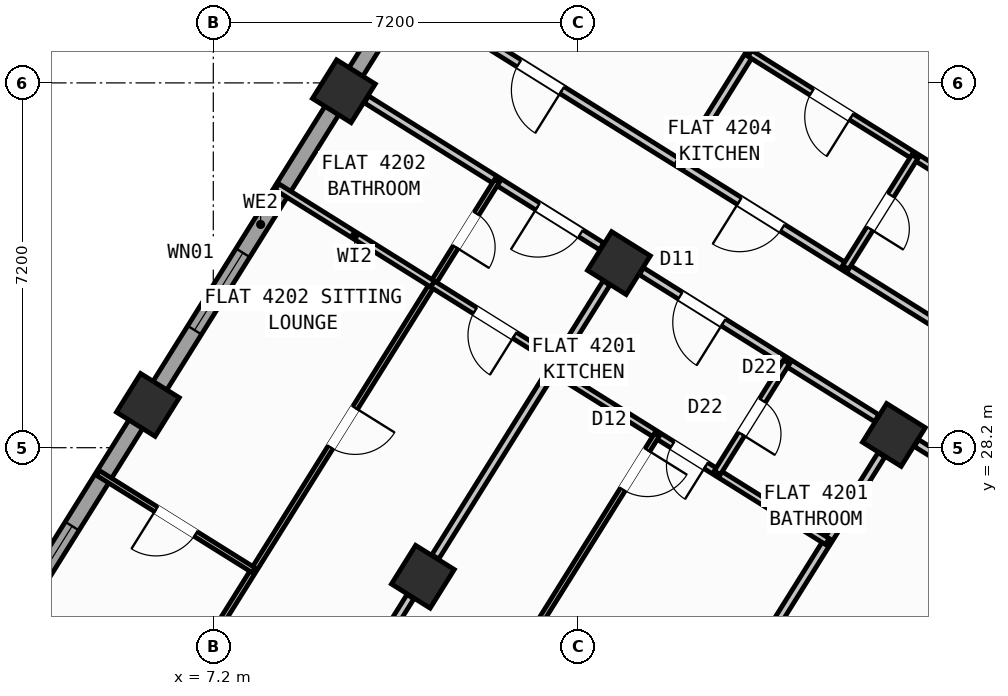
"""IFC4 building model, lengths in metres.
Left out: names, types, materials, properties, quantities, classifications, styles, units other than length and angle.
Written with IfcOpenShell. Run it as: python <this file> out.ifc"""

import sys

from ifc_helpers import new_model, si_unit, direction, frame, frame_2d, origin, origin_2d, place, context, subcontext, project, spatial, rectangle, hollow_rectangle, extrude, source, transform, mapped, element, fill, save


model = new_model("IFC4")
c1 = context("Model", 3, precision=1e-05, world=origin(), true_north=direction((0.0, 1.0)))
c2 = subcontext(c1, "Body", "Model", "MODEL_VIEW")
j1 = project(units=[si_unit("LENGTHUNIT", "METRE"), si_unit("PLANEANGLEUNIT", "RADIAN")], contexts=[c1])
p1 = place(None, origin())
s1 = spatial("IfcSite", under=j1, at=p1, CompositionType="ELEMENT")
p2 = place(p1, origin())
s2 = spatial("IfcBuilding", under=s1, at=p2, CompositionType="ELEMENT")
p3 = place(p2, frame((0.0, 0.0, 165.9)))
s3 = spatial("IfcBuildingStorey", under=s2, at=p3, CompositionType="ELEMENT", Elevation=165.9)
m1 = source(origin(), c2, "Body", "SweptSolid", [
    extrude(hollow_rectangle(XDim=0.9, YDim=0.9, WallThickness=0.036, at=origin_2d()), origin(), (0.0, 0.0, 1.0), 3.6),
])
for number, where, z_axis, x_axis in (
    (1, (20.632, 28.452, 0.0), (0.0, 0.0, 1.0), (-0.848, 0.53, 0.0)),
    (2, (15.205, 31.844, 0.0), (0.0, 0.0, 1.0), (-0.848, 0.53, 0.0)),
    (3, (11.336, 25.653, 0.0), (0.0, 0.0, 1.0), (-0.848, 0.53, 0.0)),
    (4, (9.777, 35.235, 0.0), (0.0, 0.0, 1.0), (-0.848, 0.53, 0.0)),
    (5, (5.909, 29.044, 0.0), (0.0, 0.0, 1.0), (-0.848, 0.53, 0.0)),
):
    element("IfcColumn", number, at=place(p3, frame(where, z_axis=z_axis, x_axis=x_axis)), inside=s3, PredefinedType="COLUMN", context=c2, shape_type="MappedRepresentation", body=[
        mapped(m1, transform((0.0, 0.0, 0.0), scale=1.0)),
    ])
p4 = place(p3, frame((2.415, 23.452, 0.0), z_axis=(0.0, 0.0, 1.0), x_axis=(0.52991049553, 0.848053575387, 0.0)))
e6 = element("IfcWall", 6, at=p4, inside=s3, PredefinedType="STANDARD", context=c2, shape_type="SweptSolid", body=[
    extrude(rectangle(XDim=21.587, YDim=0.32, at=frame_2d((10.794, 0.0))), origin(), (0.0, 0.0, 1.0), 2.795),
])
p5 = place(p4, frame((1.673, 0.0, 0.8)))
e7 = element("IfcOpeningElement", 7, at=p5, cuts=e6, PredefinedType="OPENING", context=c2, shape_type="SweptSolid", body=[
    extrude(rectangle(XDim=2.1, YDim=1.55, at=frame_2d((1.05, 0.775))), frame((0.0, 0.17, 0.0), z_axis=(0.0, -1.0, 0.0), x_axis=(1.0, 0.0, 0.0)), (0.0, 0.0, 1.0), 0.34),
])
p6 = place(p4, frame((8.334, 0.0, 0.85)))
e8 = element("IfcOpeningElement", 8, at=p6, cuts=e6, PredefinedType="OPENING", context=c2, shape_type="SweptSolid", body=[
    extrude(rectangle(XDim=1.8, YDim=1.5, at=frame_2d((0.9, 0.75))), frame((0.0, 0.17, 0.0), z_axis=(0.0, -1.0, 0.0), x_axis=(1.0, 0.0, 0.0)), (0.0, 0.0, 1.0), 0.34),
])
p7 = place(p4, frame((17.172, 0.0, 0.85)))
e9 = element("IfcOpeningElement", 9, at=p7, cuts=e6, PredefinedType="OPENING", context=c2, shape_type="SweptSolid", body=[
    extrude(rectangle(XDim=1.5, YDim=1.5, at=frame_2d((0.75, 0.75))), frame((0.0, 0.17, 0.0), z_axis=(0.0, -1.0, 0.0), x_axis=(1.0, 0.0, 0.0)), (0.0, 0.0, 1.0), 0.34),
])
p8 = place(p3, frame((14.138, 41.825, 0.0), z_axis=(0.0, 0.0, 1.0), x_axis=(0.848046498049, -0.529921821731, 0.0)))
e10 = element("IfcWall", 10, at=p8, inside=s3, PredefinedType="STANDARD", context=c2, shape_type="SweptSolid", body=[
    extrude(rectangle(XDim=31.588, YDim=0.32, at=frame_2d((15.794, 0.0))), origin(), (0.0, 0.0, 1.0), 3.32),
])
p9 = place(p8, frame((3.253, 0.0, 0.0)))
e11 = element("IfcOpeningElement", 11, at=p9, cuts=e10, PredefinedType="OPENING", context=c2, shape_type="SweptSolid", body=[
    extrude(rectangle(XDim=1.05, YDim=2.15, at=frame_2d((0.525, 1.075))), frame((0.0, 0.17, 0.0), z_axis=(0.0, -1.0, 0.0), x_axis=(1.0, 0.0, 0.0)), (0.0, 0.0, 1.0), 0.34),
])
p10 = place(p8, frame((0.863, 0.0, 0.85)))
e12 = element("IfcOpeningElement", 12, at=p10, cuts=e10, PredefinedType="OPENING", context=c2, shape_type="SweptSolid", body=[
    extrude(rectangle(XDim=1.8, YDim=1.5, at=frame_2d((0.9, 0.75))), frame((0.0, 0.17, 0.0), z_axis=(0.0, -1.0, 0.0), x_axis=(1.0, 0.0, 0.0)), (0.0, 0.0, 1.0), 0.34),
])
p11 = place(p8, frame((8.494, 0.0, 0.85)))
e13 = element("IfcOpeningElement", 13, at=p11, cuts=e10, PredefinedType="OPENING", context=c2, shape_type="SweptSolid", body=[
    extrude(rectangle(XDim=1.8, YDim=1.5, at=frame_2d((0.9, 0.75))), frame((0.0, 0.17, 0.0), z_axis=(0.0, -1.0, 0.0), x_axis=(1.0, 0.0, 0.0)), (0.0, 0.0, 1.0), 0.34),
])
p12 = place(p8, frame((13.874, 0.0, 0.85)))
e14 = element("IfcOpeningElement", 14, at=p12, cuts=e10, PredefinedType="OPENING", context=c2, shape_type="SweptSolid", body=[
    extrude(rectangle(XDim=1.5, YDim=1.5, at=frame_2d((0.75, 0.75))), frame((0.0, 0.17, 0.0), z_axis=(0.0, -1.0, 0.0), x_axis=(1.0, 0.0, 0.0)), (0.0, 0.0, 1.0), 0.34),
])
p13 = place(p8, frame((17.104, 0.0, 1.0)))
e15 = element("IfcOpeningElement", 15, at=p13, cuts=e10, PredefinedType="OPENING", context=c2, shape_type="SweptSolid", body=[
    extrude(rectangle(XDim=0.9, YDim=1.25, at=frame_2d((0.45, 0.625))), frame((0.0, 0.17, 0.0), z_axis=(0.0, -1.0, 0.0), x_axis=(1.0, 0.0, 0.0)), (0.0, 0.0, 1.0), 0.34),
])
p14 = place(p8, frame((22.144, 0.0, 1.0)))
e16 = element("IfcOpeningElement", 16, at=p14, cuts=e10, PredefinedType="OPENING", context=c2, shape_type="SweptSolid", body=[
    extrude(rectangle(XDim=0.9, YDim=1.25, at=frame_2d((0.45, 0.625))), frame((0.0, 0.17, 0.0), z_axis=(0.0, -1.0, 0.0), x_axis=(1.0, 0.0, 0.0)), (0.0, 0.0, 1.0), 0.34),
])
p15 = place(p8, frame((27.744, 0.0, 1.0)))
e17 = element("IfcOpeningElement", 17, at=p15, cuts=e10, PredefinedType="OPENING", context=c2, shape_type="SweptSolid", body=[
    extrude(rectangle(XDim=0.9, YDim=1.25, at=frame_2d((0.45, 0.625))), frame((0.0, 0.17, 0.0), z_axis=(0.0, -1.0, 0.0), x_axis=(1.0, 0.0, 0.0)), (0.0, 0.0, 1.0), 0.34),
])
p16 = place(p3, frame((23.899, 26.529, 0.0), z_axis=(0.0, 0.0, 1.0), x_axis=(-0.529917716469, -0.848049063305, 0.0)))
e18 = element("IfcWall", 18, at=p16, inside=s3, PredefinedType="PARTITIONING", context=c2, shape_type="SweptSolid", body=[
    extrude(rectangle(XDim=14.05, YDim=0.16, at=frame_2d((7.025, 0.0))), origin(), (0.0, 0.0, 1.0), 3.31),
])
p17 = place(p3, frame((25.065, 28.394, 0.0), z_axis=(0.0, 0.0, 1.0), x_axis=(-0.848048310262, 0.529918921593, 0.0)))
e19 = element("IfcWall", 19, at=p17, inside=s3, PredefinedType="PARTITIONING", context=c2, shape_type="SweptSolid", body=[
    extrude(rectangle(XDim=16.73, YDim=0.16, at=frame_2d((8.365, 0.0))), origin(), (0.0, 0.0, 1.0), 3.31),
])
p18 = place(p17, frame((2.22, 0.0, 0.0)))
e20 = element("IfcOpeningElement", 20, at=p18, cuts=e19, PredefinedType="OPENING", context=c2, shape_type="SweptSolid", body=[
    extrude(rectangle(XDim=0.86, YDim=2.05, at=frame_2d((0.43, 1.025))), frame((0.0, 0.09, 0.0), z_axis=(0.0, -1.0, 0.0), x_axis=(1.0, 0.0, 0.0)), (0.0, 0.0, 1.0), 0.18),
])
p19 = place(p17, frame((7.82, 0.0, 0.0)))
e21 = element("IfcOpeningElement", 21, at=p19, cuts=e19, PredefinedType="OPENING", context=c2, shape_type="SweptSolid", body=[
    extrude(rectangle(XDim=1.0, YDim=2.1, at=frame_2d((0.5, 1.05))), frame((0.0, 0.09, 0.0), z_axis=(0.0, -1.0, 0.0), x_axis=(1.0, 0.0, 0.0)), (0.0, 0.0, 1.0), 0.18),
])
p20 = place(p17, frame((12.95, 0.0, 0.0)))
e22 = element("IfcOpeningElement", 22, at=p20, cuts=e19, PredefinedType="OPENING", context=c2, shape_type="SweptSolid", body=[
    extrude(rectangle(XDim=1.0, YDim=2.1, at=frame_2d((0.5, 1.05))), frame((0.0, 0.09, 0.0), z_axis=(0.0, -1.0, 0.0), x_axis=(1.0, 0.0, 0.0)), (0.0, 0.0, 1.0), 0.18),
])
p21 = place(p3, frame((23.899, 26.529, 0.0), z_axis=(0.0, 0.0, 1.0), x_axis=(-0.848064240775, 0.529893426567, 0.0)))
e23 = element("IfcWall", 23, at=p21, inside=s3, PredefinedType="PARTITIONING", context=c2, shape_type="SweptSolid", body=[
    extrude(rectangle(XDim=3.328, YDim=0.16, at=frame_2d((1.664, 0.0))), origin(), (0.0, 0.0, 1.0), 2.795),
])
p22 = place(p21, frame((1.395, 0.0, 0.0)))
e24 = element("IfcOpeningElement", 24, at=p22, cuts=e23, PredefinedType="OPENING", context=c2, shape_type="SweptSolid", body=[
    extrude(rectangle(XDim=1.0, YDim=2.1, at=frame_2d((0.5, 1.05))), frame((0.0, 0.09, 0.0), z_axis=(0.0, -1.0, 0.0), x_axis=(1.0, 0.0, 0.0)), (0.0, 0.0, 1.0), 0.18),
])
p23 = place(p3, frame((20.293, 28.782, 0.0), z_axis=(0.0, 0.0, 1.0), x_axis=(-0.848040881926, 0.529930809241, 0.0)))
e25 = element("IfcWall", 25, at=p23, inside=s3, PredefinedType="PARTITIONING", context=c2, shape_type="SweptSolid", body=[
    extrude(rectangle(XDim=5.476, YDim=0.16, at=frame_2d((2.738, 0.0))), origin(), (0.0, 0.0, 1.0), 2.795),
])
p24 = place(p23, frame((3.568, 0.0, 0.0)))
e26 = element("IfcOpeningElement", 26, at=p24, cuts=e25, PredefinedType="OPENING", context=c2, shape_type="SweptSolid", body=[
    extrude(rectangle(XDim=1.0, YDim=2.1, at=frame_2d((0.5, 1.05))), frame((0.0, 0.09, 0.0), z_axis=(0.0, -1.0, 0.0), x_axis=(1.0, 0.0, 0.0)), (0.0, 0.0, 1.0), 0.18),
])
p25 = place(p3, frame((14.866, 32.173, 0.0), z_axis=(0.0, 0.0, 1.0), x_axis=(-0.848053401719, 0.529910773464, 0.0)))
e27 = element("IfcWall", 27, at=p25, inside=s3, PredefinedType="PARTITIONING", context=c2, shape_type="SweptSolid", body=[
    extrude(rectangle(XDim=5.476, YDim=0.16, at=frame_2d((2.738, 0.0))), origin(), (0.0, 0.0, 1.0), 2.795),
])
p26 = place(p25, frame((0.488, 0.0, 0.0)))
e28 = element("IfcOpeningElement", 28, at=p26, cuts=e27, PredefinedType="OPENING", context=c2, shape_type="SweptSolid", body=[
    extrude(rectangle(XDim=1.0, YDim=2.1, at=frame_2d((0.5, 1.05))), frame((0.0, 0.09, 0.0), z_axis=(0.0, -1.0, 0.0), x_axis=(1.0, 0.0, 0.0)), (0.0, 0.0, 1.0), 0.18),
])
for number, where, z_axis, x_axis in (
    (29, (20.387, 28.06, 0.0), (0.0, 0.0, 1.0), (-0.53, -0.848, 0.0)),
    (30, (14.96, 31.452, 0.0), (0.0, 0.0, 1.0), (-0.53, -0.848, 0.0)),
):
    element("IfcWall", number, at=place(p3, frame(where, z_axis=z_axis, x_axis=x_axis)), inside=s3, PredefinedType="PARTITIONING", context=c2, shape_type="SweptSolid", body=[
        extrude(rectangle(XDim=6.376, YDim=0.16, at=frame_2d((3.188, 0.0))), origin(), (0.0, 0.0, 1.0), 2.795),
    ])
p27 = place(p3, frame((11.091, 25.261, 0.0), z_axis=(0.0, 0.0, 1.0), x_axis=(-0.52994257524, -0.848033529377, 0.0)))
e31 = element("IfcWall", 31, at=p27, inside=s3, PredefinedType="PARTITIONING", context=c2, shape_type="SweptSolid", body=[
    extrude(rectangle(XDim=5.451, YDim=0.16, at=frame_2d((2.726, 0.0))), origin(), (0.0, 0.0, 1.0), 2.795),
])
p28 = place(p3, frame((19.318, 26.349, 0.0), z_axis=(0.0, 0.0, 1.0), x_axis=(-0.848039019877, 0.529933789039, 0.0)))
e32 = element("IfcWall", 32, at=p28, inside=s3, PredefinedType="PLUMBINGWALL", context=c2, shape_type="SweptSolid", body=[
    extrude(rectangle(XDim=6.4, YDim=0.14, at=frame_2d((3.2, 0.0))), origin(), (0.0, 0.0, 1.0), 3.31),
])
p29 = place(p28, frame((2.824, 0.0, 0.0)))
e33 = element("IfcOpeningElement", 33, at=p29, cuts=e32, PredefinedType="OPENING", context=c2, shape_type="SweptSolid", body=[
    extrude(rectangle(XDim=0.78, YDim=2.05, at=frame_2d((0.39, 1.025))), frame((0.0, 0.08, 0.0), z_axis=(0.0, -1.0, 0.0), x_axis=(1.0, 0.0, 0.0)), (0.0, 0.0, 1.0), 0.16),
])
p30 = place(p3, frame((18.514, 29.894, 0.0), z_axis=(0.0, 0.0, 1.0), x_axis=(-0.529913878929, -0.848051461244, 0.0)))
e34 = element("IfcWall", 34, at=p30, inside=s3, PredefinedType="PLUMBINGWALL", context=c2, shape_type="SweptSolid", body=[
    extrude(rectangle(XDim=2.58, YDim=0.14, at=frame_2d((1.29, 0.0))), origin(), (0.0, 0.0, 1.0), 3.31),
])
p31 = place(p30, frame((0.9, 0.0, 0.0)))
e35 = element("IfcOpeningElement", 35, at=p31, cuts=e34, PredefinedType="OPENING", context=c2, shape_type="SweptSolid", body=[
    extrude(rectangle(XDim=0.78, YDim=2.05, at=frame_2d((0.39, 1.025))), frame((0.0, 0.08, 0.0), z_axis=(0.0, -1.0, 0.0), x_axis=(1.0, 0.0, 0.0)), (0.0, 0.0, 1.0), 0.16),
])
p32 = place(p3, frame((15.953, 28.452, 0.0), z_axis=(0.0, 0.0, 1.0), x_axis=(-0.529931645041, -0.848040359643, 0.0)))
e36 = element("IfcWall", 36, at=p32, inside=s3, PredefinedType="PARTITIONING", context=c2, shape_type="SweptSolid", body=[
    extrude(rectangle(XDim=11.74, YDim=0.11, at=frame_2d((5.87, 0.0))), origin(), (0.0, 0.0, 1.0), 3.31),
])
p33 = place(p32, frame((0.35, 0.0, 0.0)))
e37 = element("IfcOpeningElement", 37, at=p33, cuts=e36, PredefinedType="OPENING", context=c2, shape_type="SweptSolid", body=[
    extrude(rectangle(XDim=0.92, YDim=2.08, at=frame_2d((0.46, 1.04))), frame((0.0, 0.065, 0.0), z_axis=(0.0, -1.0, 0.0), x_axis=(1.0, 0.0, 0.0)), (0.0, 0.0, 1.0), 0.13),
])
p34 = place(p3, frame((12.798, 33.465, 0.0), z_axis=(0.0, 0.0, 1.0), x_axis=(-0.529916182913, -0.848050021571, 0.0)))
e38 = element("IfcWall", 38, at=p34, inside=s3, PredefinedType="PARTITIONING", context=c2, shape_type="SweptSolid", body=[
    extrude(rectangle(XDim=14.32, YDim=0.11, at=frame_2d((7.16, 0.0))), origin(), (0.0, 0.0, 1.0), 3.31),
])
p35 = place(p34, frame((0.76, 0.0, 0.0)))
e39 = element("IfcOpeningElement", 39, at=p35, cuts=e38, PredefinedType="OPENING", context=c2, shape_type="SweptSolid", body=[
    extrude(rectangle(XDim=0.78, YDim=2.05, at=frame_2d((0.39, 1.025))), frame((0.0, 0.065, 0.0), z_axis=(0.0, -1.0, 0.0), x_axis=(1.0, 0.0, 0.0)), (0.0, 0.0, 1.0), 0.13),
])
p36 = place(p34, frame((5.281, 0.0, 0.0)))
e40 = element("IfcOpeningElement", 40, at=p36, cuts=e38, PredefinedType="OPENING", context=c2, shape_type="SweptSolid", body=[
    extrude(rectangle(XDim=0.92, YDim=2.08, at=frame_2d((0.46, 1.04))), frame((0.0, 0.065, 0.0), z_axis=(0.0, -1.0, 0.0), x_axis=(1.0, 0.0, 0.0)), (0.0, 0.0, 1.0), 0.13),
])
p37 = place(p3, frame((13.986, 29.893, 0.0), z_axis=(0.0, 0.0, 1.0), x_axis=(-0.84802195137, 0.529961102341, 0.0)))
e41 = element("IfcWall", 41, at=p37, inside=s3, PredefinedType="PLUMBINGWALL", context=c2, shape_type="SweptSolid", body=[
    extrude(rectangle(XDim=2.9, YDim=0.14, at=frame_2d((1.45, 0.0))), origin(), (0.0, 0.0, 1.0), 3.31),
])
p38 = place(p37, frame((0.99, 0.0, 0.0)))
e42 = element("IfcOpeningElement", 42, at=p38, cuts=e41, PredefinedType="OPENING", context=c2, shape_type="SweptSolid", body=[
    extrude(rectangle(XDim=0.92, YDim=2.08, at=frame_2d((0.46, 1.04))), frame((0.0, 0.08, 0.0), z_axis=(0.0, -1.0, 0.0), x_axis=(1.0, 0.0, 0.0)), (0.0, 0.0, 1.0), 0.16),
])
p39 = place(p3, frame((11.526, 31.43, 0.0), z_axis=(0.0, 0.0, 1.0), x_axis=(-0.848051346257, 0.52991406295, 0.0)))
e43 = element("IfcWall", 43, at=p39, inside=s3, PredefinedType="PLUMBINGWALL", context=c2, shape_type="SweptSolid", body=[
    extrude(rectangle(XDim=3.62, YDim=0.14, at=frame_2d((1.81, 0.0))), origin(), (0.0, 0.0, 1.0), 3.31),
])
p40 = place(p3, frame((7.997, 25.781, 0.0), z_axis=(0.0, 0.0, 1.0), x_axis=(-0.848051346257, 0.52991406295, 0.0)))
e44 = element("IfcWall", 44, at=p40, inside=s3, PredefinedType="PARTITIONING", context=c2, shape_type="SweptSolid", body=[
    extrude(rectangle(XDim=3.62, YDim=0.11, at=frame_2d((1.81, 0.0))), origin(), (0.0, 0.0, 1.0), 3.31),
])
p41 = place(p40, frame((1.35, 0.0, 0.0)))
e45 = element("IfcOpeningElement", 45, at=p41, cuts=e44, PredefinedType="OPENING", context=c2, shape_type="SweptSolid", body=[
    extrude(rectangle(XDim=0.92, YDim=2.08, at=frame_2d((0.46, 1.04))), frame((0.0, 0.065, 0.0), z_axis=(0.0, -1.0, 0.0), x_axis=(1.0, 0.0, 0.0)), (0.0, 0.0, 1.0), 0.13),
])
p42 = place(p3, frame((18.828, 37.643, 0.0), z_axis=(0.0, 0.0, 1.0), x_axis=(-0.529926399231, -0.848043637673, 0.0)))
e46 = element("IfcWall", 46, at=p42, inside=s3, PredefinedType="PARTITIONING", context=c2, shape_type="SweptSolid", body=[
    extrude(rectangle(XDim=4.538, YDim=0.16, at=frame_2d((2.269, 0.0))), origin(), (0.0, 0.0, 1.0), 2.795),
])
p43 = place(p3, frame((23.218, 32.591, 0.0), z_axis=(0.0, 0.0, 1.0), x_axis=(-0.848056163074, 0.529906354247, 0.0)))
e47 = element("IfcWall", 47, at=p43, inside=s3, PredefinedType="PLUMBINGWALL", context=c2, shape_type="SweptSolid", body=[
    extrude(rectangle(XDim=6.4, YDim=0.14, at=frame_2d((3.2, 0.0))), origin(), (0.0, 0.0, 1.0), 3.31),
])
p44 = place(p43, frame((4.04, 0.0, 0.0)))
e48 = element("IfcOpeningElement", 48, at=p44, cuts=e47, PredefinedType="OPENING", context=c2, shape_type="SweptSolid", body=[
    extrude(rectangle(XDim=0.92, YDim=2.08, at=frame_2d((0.46, 1.04))), frame((0.0, 0.08, 0.0), z_axis=(0.0, -1.0, 0.0), x_axis=(1.0, 0.0, 0.0)), (0.0, 0.0, 1.0), 0.16),
])
p45 = place(p3, frame((21.047, 33.947, 0.0), z_axis=(0.0, 0.0, 1.0), x_axis=(-0.529913878929, -0.848051461244, 0.0)))
e49 = element("IfcWall", 49, at=p45, inside=s3, PredefinedType="PLUMBINGWALL", context=c2, shape_type="SweptSolid", body=[
    extrude(rectangle(XDim=2.58, YDim=0.14, at=frame_2d((1.29, 0.0))), origin(), (0.0, 0.0, 1.0), 3.31),
])
p46 = place(p45, frame((0.9, 0.0, 0.0)))
e50 = element("IfcOpeningElement", 50, at=p46, cuts=e49, PredefinedType="OPENING", context=c2, shape_type="SweptSolid", body=[
    extrude(rectangle(XDim=0.78, YDim=2.05, at=frame_2d((0.39, 1.025))), frame((0.0, 0.08, 0.0), z_axis=(0.0, -1.0, 0.0), x_axis=(1.0, 0.0, 0.0)), (0.0, 0.0, 1.0), 0.16),
])
m2 = source(origin(), c2, "Body", "SweptSolid", [
    extrude(rectangle(XDim=2.1, YDim=1.55, at=frame_2d((1.05, 0.775))), frame((0.0, 0.03, 0.0), z_axis=(0.0, -1.0, 0.0), x_axis=(1.0, 0.0, 0.0)), (0.0, 0.0, 1.0), 0.06),
])
p47 = place(p5, origin())
e51 = element("IfcWindow", 51, at=p47, inside=s3, PartitioningType="SINGLE_PANEL", PredefinedType="WINDOW", context=c2, shape_type="MappedRepresentation", body=[
    mapped(m2, transform((0.0, 0.0, 0.0), scale=1.0)),
])
fill(e7, e51)
m3 = source(origin(), c2, "Body", "SweptSolid", [
    extrude(rectangle(XDim=1.8, YDim=1.5, at=frame_2d((0.9, 0.75))), frame((0.0, 0.03, 0.0), z_axis=(0.0, -1.0, 0.0), x_axis=(1.0, 0.0, 0.0)), (0.0, 0.0, 1.0), 0.06),
])
p48 = place(p6, origin())
e52 = element("IfcWindow", 52, at=p48, inside=s3, PartitioningType="SINGLE_PANEL", PredefinedType="WINDOW", context=c2, shape_type="MappedRepresentation", body=[
    mapped(m3, transform((0.0, 0.0, 0.0), scale=1.0)),
])
fill(e8, e52)
m4 = source(origin(), c2, "Body", "SweptSolid", [
    extrude(rectangle(XDim=0.92, YDim=2.08, at=frame_2d((0.46, 1.04))), frame((0.0, 0.025, 0.0), z_axis=(0.0, -1.0, 0.0), x_axis=(1.0, 0.0, 0.0)), (0.0, 0.0, 1.0), 0.05),
])
p49 = place(p33, origin())
e53 = element("IfcDoor", 53, at=p49, inside=s3, OperationType="SINGLE_SWING_LEFT", PredefinedType="DOOR", context=c2, shape_type="MappedRepresentation", body=[
    mapped(m4, transform((0.0, 0.0, 0.0), scale=1.0)),
])
fill(e37, e53)
m5 = source(origin(), c2, "Body", "SweptSolid", [
    extrude(rectangle(XDim=1.0, YDim=2.1, at=frame_2d((0.5, 1.05))), frame((0.0, 0.025, 0.0), z_axis=(0.0, -1.0, 0.0), x_axis=(1.0, 0.0, 0.0)), (0.0, 0.0, 1.0), 0.05),
])
p50 = place(p24, origin())
e54 = element("IfcDoor", 54, at=p50, inside=s3, OperationType="SINGLE_SWING_LEFT", PredefinedType="DOOR", context=c2, shape_type="MappedRepresentation", body=[
    mapped(m5, transform((0.0, 0.0, 0.0), scale=1.0)),
])
fill(e26, e54)
m6 = source(origin(), c2, "Body", "SweptSolid", [
    extrude(rectangle(XDim=0.78, YDim=2.05, at=frame_2d((0.39, 1.025))), frame((0.0, 0.025, 0.0), z_axis=(0.0, -1.0, 0.0), x_axis=(1.0, 0.0, 0.0)), (0.0, 0.0, 1.0), 0.05),
])
p51 = place(p29, origin())
e55 = element("IfcDoor", 55, at=p51, inside=s3, OperationType="SINGLE_SWING_LEFT", PredefinedType="DOOR", context=c2, shape_type="MappedRepresentation", body=[
    mapped(m6, transform((0.0, 0.0, 0.0), scale=1.0)),
])
fill(e33, e55)
p52 = place(p31, origin())
e56 = element("IfcDoor", 56, at=p52, inside=s3, OperationType="SINGLE_SWING_RIGHT", PredefinedType="DOOR", context=c2, shape_type="MappedRepresentation", body=[
    mapped(m6, transform((0.0, 0.0, 0.0), scale=1.0)),
])
fill(e35, e56)
p53 = place(p26, origin())
e57 = element("IfcDoor", 57, at=p53, inside=s3, OperationType="SINGLE_SWING_RIGHT", PredefinedType="DOOR", context=c2, shape_type="MappedRepresentation", body=[
    mapped(m5, transform((0.0, 0.0, 0.0), scale=1.0)),
])
fill(e28, e57)
p54 = place(p38, origin())
e58 = element("IfcDoor", 58, at=p54, inside=s3, OperationType="SINGLE_SWING_LEFT", PredefinedType="DOOR", context=c2, shape_type="MappedRepresentation", body=[
    mapped(m4, transform((0.0, 0.0, 0.0), scale=1.0)),
])
fill(e42, e58)
p55 = place(p35, origin())
e59 = element("IfcDoor", 59, at=p55, inside=s3, OperationType="SINGLE_SWING_RIGHT", PredefinedType="DOOR", context=c2, shape_type="MappedRepresentation", body=[
    mapped(m6, transform((0.0, 0.0, 0.0), scale=1.0)),
])
fill(e39, e59)
p56 = place(p36, origin())
e60 = element("IfcDoor", 60, at=p56, inside=s3, OperationType="SINGLE_SWING_LEFT", PredefinedType="DOOR", context=c2, shape_type="MappedRepresentation", body=[
    mapped(m4, transform((0.0, 0.0, 0.0), scale=1.0)),
])
fill(e40, e60)
p57 = place(p41, origin())
e61 = element("IfcDoor", 61, at=p57, inside=s3, OperationType="SINGLE_SWING_RIGHT", PredefinedType="DOOR", context=c2, shape_type="MappedRepresentation", body=[
    mapped(m4, transform((0.0, 0.0, 0.0), scale=1.0)),
])
fill(e45, e61)
p58 = place(p19, origin())
e62 = element("IfcDoor", 62, at=p58, inside=s3, OperationType="SINGLE_SWING_RIGHT", PredefinedType="DOOR", context=c2, shape_type="MappedRepresentation", body=[
    mapped(m5, transform((0.0, 0.0, 0.0), scale=1.0)),
])
fill(e21, e62)
p59 = place(p44, origin())
e63 = element("IfcDoor", 63, at=p59, inside=s3, OperationType="SINGLE_SWING_LEFT", PredefinedType="DOOR", context=c2, shape_type="MappedRepresentation", body=[
    mapped(m4, transform((0.0, 0.0, 0.0), scale=1.0)),
])
fill(e48, e63)
p60 = place(p46, origin())
e64 = element("IfcDoor", 64, at=p60, inside=s3, OperationType="SINGLE_SWING_RIGHT", PredefinedType="DOOR", context=c2, shape_type="MappedRepresentation", body=[
    mapped(m6, transform((0.0, 0.0, 0.0), scale=1.0)),
])
fill(e50, e64)
p61 = place(p20, origin())
e65 = element("IfcDoor", 65, at=p61, inside=s3, OperationType="SINGLE_SWING_LEFT", PredefinedType="DOOR", context=c2, shape_type="MappedRepresentation", body=[
    mapped(m5, transform((0.0, 0.0, 0.0), scale=1.0)),
])
fill(e22, e65)
save(model, sys.argv[1])
